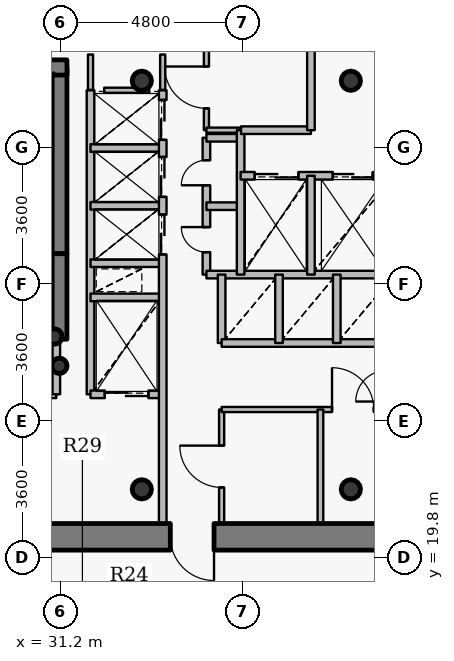
"""IFC4 building model, lengths in metres.
Left out: names, types, materials, properties, quantities, classifications, styles, units other than length and angle.
Written with IfcOpenShell. Run it as: python <this file> out.ifc"""

import sys

from ifc_helpers import new_model, si_unit, direction, frame, frame_2d, origin, origin_2d, place, context, subcontext, project, spatial, rectangle, hollow_circle, extrude, source, transform, mapped, element, fill, save


model = new_model("IFC4")
c1 = context("Model", 3, precision=1e-05, world=origin(), true_north=direction((0.0, 1.0)))
c2 = subcontext(c1, "Body", "Model", "MODEL_VIEW")
j1 = project(units=[si_unit("LENGTHUNIT", "METRE"), si_unit("PLANEANGLEUNIT", "RADIAN")], contexts=[c1])
p1 = place(None, origin())
s1 = spatial("IfcSite", under=j1, at=p1, CompositionType="ELEMENT")
p2 = place(p1, origin())
s2 = spatial("IfcBuilding", under=s1, at=p2, CompositionType="ELEMENT")
p3 = place(p2, frame((0.0, 0.0, 236.55)))
s3 = spatial("IfcBuildingStorey", under=s2, at=p3, CompositionType="ELEMENT", Elevation=236.55)
for number, where, z_axis, x_axis in (
    (1, (33.35, 21.6, 0.0), (0.0, 0.0, 1.0), (1.0, 0.0, 0.0)),
    (2, (38.85, 21.6, 0.0), (0.0, 0.0, 1.0), (1.0, 0.0, 0.0)),
    (3, (38.85, 32.35, 0.0), (0.0, 0.0, 1.0), (1.0, 0.0, 0.0)),
    (4, (33.35, 32.35, 0.0), (0.0, 0.0, 1.0), (1.0, 0.0, 0.0)),
):
    element("IfcColumn", number, at=place(p3, frame(where, z_axis=z_axis, x_axis=x_axis)), inside=s3, PredefinedType="COLUMN", context=c2, shape_type="SweptSolid", body=[
        extrude(hollow_circle(Radius=0.254, WallThickness=0.02, at=origin_2d()), origin(), (0.0, 0.0, 1.0), 3.75),
    ])
p4 = place(p3, frame((31.18, 27.8, 0.0), z_axis=(0.0, 0.0, 1.0), x_axis=(0.0, 1.0, 0.0)))
e5 = element("IfcWall", 5, at=p4, inside=s3, PredefinedType="SHEAR", context=c2, shape_type="SweptSolid", body=[
    extrude(rectangle(XDim=4.9, YDim=0.4, at=frame_2d((2.45, 0.0))), origin(), (0.0, 0.0, 1.0), 3.75),
])
p5 = place(p3, frame((27.28, 32.7, 0.0), z_axis=(0.0, 0.0, 1.0), x_axis=(1.0, 0.0, 0.0)))
e6 = element("IfcWall", 6, at=p5, inside=s3, PredefinedType="SHEAR", context=c2, shape_type="SweptSolid", body=[
    extrude(rectangle(XDim=4.1, YDim=0.4, at=frame_2d((2.05, 0.0))), origin(), (0.0, 0.0, 1.0), 3.75),
])
for number, where, z_axis, x_axis in (
    (7, (31.05, 25.62, 0.0), (0.0, 0.0, 1.0), (1.0, 0.0, 0.0)),
    (8, (31.18, 24.85, 0.0), (0.0, 0.0, 1.0), (1.0, 0.0, 0.0)),
):
    element("IfcColumn", number, at=place(p3, frame(where, z_axis=z_axis, x_axis=x_axis)), inside=s3, PredefinedType="COLUMN", context=c2, shape_type="SweptSolid", body=[
        extrude(hollow_circle(Radius=0.203, WallThickness=0.016, at=origin_2d()), origin(), (0.0, 0.0, 1.0), 3.75),
    ])
p6 = place(p3, frame((44.95, 20.35, 0.0), z_axis=(0.0, 0.0, 1.0), x_axis=(-1.0, 0.0, 0.0)))
e9 = element("IfcWall", 9, at=p6, inside=s3, PredefinedType="SHEAR", context=c2, shape_type="SweptSolid", body=[
    extrude(rectangle(XDim=17.9, YDim=0.7, at=frame_2d((8.95, 0.0))), origin(), (0.0, 0.0, 1.0), 3.05),
])
p7 = place(p6, frame((9.7, 0.0, 0.0)))
e10 = element("IfcOpeningElement", 10, at=p7, cuts=e9, PredefinedType="OPENING", context=c2, shape_type="SweptSolid", body=[
    extrude(rectangle(XDim=1.15, YDim=2.15, at=origin_2d()), frame((0.575, 0.36, 1.075), z_axis=(0.0, -1.0, 0.0), x_axis=(1.0, 0.0, 0.0)), (0.0, 0.0, 1.0), 0.72),
])
p8 = place(p3, frame((31.18, 25.55, 0.0), z_axis=(0.0, 0.0, 1.0), x_axis=(0.0, 1.0, 0.0)))
e11 = element("IfcWall", 11, at=p8, inside=s3, PredefinedType="SHEAR", context=c2, shape_type="SweptSolid", body=[
    extrude(rectangle(XDim=2.25, YDim=0.4, at=frame_2d((1.125, 0.0))), origin(), (0.0, 0.0, 1.0), 3.1),
])
p9 = place(p3, frame((27.56, 24.1, 0.0), z_axis=(0.0, 0.0, 1.0), x_axis=(1.0, 0.0, 0.0)))
e12 = element("IfcWall", 12, at=p9, inside=s3, PredefinedType="PARTITIONING", context=c2, shape_type="SweptSolid", body=[
    extrude(rectangle(XDim=3.54, YDim=0.2, at=frame_2d((1.77, 0.0))), origin(), (0.0, 0.0, 1.0), 3.5),
])
p10 = place(p9, frame((1.17, 0.0, 0.0)))
e13 = element("IfcOpeningElement", 13, at=p10, cuts=e12, PredefinedType="OPENING", context=c2, shape_type="SweptSolid", body=[
    extrude(rectangle(XDim=1.2, YDim=2.15, at=origin_2d()), frame((0.6, 0.11, 1.075), z_axis=(0.0, -1.0, 0.0), x_axis=(1.0, 0.0, 0.0)), (0.0, 0.0, 1.0), 0.22),
])
p11 = place(p3, frame((31.1, 24.1, 0.0), z_axis=(0.0, 0.0, 1.0), x_axis=(0.0, 1.0, 0.0)))
e14 = element("IfcWall", 14, at=p11, inside=s3, PredefinedType="PARTITIONING", context=c2, shape_type="SweptSolid", body=[
    extrude(rectangle(XDim=1.44, YDim=0.2, at=frame_2d((0.72, 0.0))), origin(), (0.0, 0.0, 1.0), 3.5),
])
p12 = place(p3, frame((32.0, 24.1, 0.0), z_axis=(0.0, 0.0, 1.0), x_axis=(0.0, 1.0, 0.0)))
e15 = element("IfcWall", 15, at=p12, inside=s3, PredefinedType="PARTITIONING", context=c2, shape_type="SweptSolid", body=[
    extrude(rectangle(XDim=8.0, YDim=0.2, at=frame_2d((4.0, 0.0))), origin(), (0.0, 0.0, 1.0), 3.5),
])
p13 = place(p3, frame((32.0, 24.1, 0.0), z_axis=(0.0, 0.0, 1.0), x_axis=(1.0, 0.0, 0.0)))
e16 = element("IfcWall", 16, at=p13, inside=s3, PredefinedType="PARTITIONING", context=c2, shape_type="SweptSolid", body=[
    extrude(rectangle(XDim=1.9, YDim=0.2, at=frame_2d((0.95, 0.0))), origin(), (0.0, 0.0, 1.0), 3.085),
])
p14 = place(p13, frame((0.375, 0.0, 0.0)))
e17 = element("IfcOpeningElement", 17, at=p14, cuts=e16, PredefinedType="OPENING", context=c2, shape_type="SweptSolid", body=[
    extrude(rectangle(XDim=1.15, YDim=2.15, at=origin_2d()), frame((0.575, 0.11, 1.075), z_axis=(0.0, -1.0, 0.0), x_axis=(1.0, 0.0, 0.0)), (0.0, 0.0, 1.0), 0.22),
])
for number, where, z_axis, x_axis in (
    (18, (32.0, 26.65, 0.0), (0.0, 0.0, 1.0), (1.0, 0.0, 0.0)),
    (19, (32.0, 27.55, 0.0), (0.0, 0.0, 1.0), (1.0, 0.0, 0.0)),
    (20, (32.0, 29.06, 0.0), (0.0, 0.0, 1.0), (1.0, 0.0, 0.0)),
    (21, (32.0, 30.58, 0.0), (0.0, 0.0, 1.0), (1.0, 0.0, 0.0)),
):
    element("IfcWall", number, at=place(p3, frame(where, z_axis=z_axis, x_axis=x_axis)), inside=s3, PredefinedType="PARTITIONING", context=c2, shape_type="SweptSolid", body=[
        extrude(rectangle(XDim=1.9, YDim=0.2, at=frame_2d((0.95, 0.0))), origin(), (0.0, 0.0, 1.0), 3.085),
    ])
p15 = place(p3, frame((33.9, 20.7, 0.0), z_axis=(0.0, 0.0, 1.0), x_axis=(0.0, 1.0, 0.0)))
e22 = element("IfcWall", 22, at=p15, inside=s3, PredefinedType="PARTITIONING", context=c2, shape_type="SweptSolid", body=[
    extrude(rectangle(XDim=11.4, YDim=0.2, at=frame_2d((5.7, 0.0))), origin(), (0.0, 0.0, 1.0), 3.085),
])
p16 = place(p15, frame((7.08, 0.0, 0.0)))
e23 = element("IfcOpeningElement", 23, at=p16, cuts=e22, PredefinedType="OPENING", context=c2, shape_type="SweptSolid", body=[
    extrude(rectangle(XDim=1.05, YDim=2.15, at=origin_2d()), frame((0.525, 0.11, 1.075), z_axis=(0.0, -1.0, 0.0), x_axis=(1.0, 0.0, 0.0)), (0.0, 0.0, 1.0), 0.22),
])
p17 = place(p15, frame((8.595, 0.0, 0.0)))
e24 = element("IfcOpeningElement", 24, at=p17, cuts=e22, PredefinedType="OPENING", context=c2, shape_type="SweptSolid", body=[
    extrude(rectangle(XDim=1.05, YDim=2.15, at=origin_2d()), frame((0.525, 0.11, 1.075), z_axis=(0.0, -1.0, 0.0), x_axis=(1.0, 0.0, 0.0)), (0.0, 0.0, 1.0), 0.22),
])
p18 = place(p15, frame((10.095, 0.0, 0.0)))
e25 = element("IfcOpeningElement", 25, at=p18, cuts=e22, PredefinedType="OPENING", context=c2, shape_type="SweptSolid", body=[
    extrude(rectangle(XDim=1.05, YDim=2.15, at=origin_2d()), frame((0.525, 0.11, 1.075), z_axis=(0.0, -1.0, 0.0), x_axis=(1.0, 0.0, 0.0)), (0.0, 0.0, 1.0), 0.22),
])
p19 = place(p3, frame((35.05, 27.25, 0.0), z_axis=(0.0, 0.0, 1.0), x_axis=(0.0, 1.0, 0.0)))
e26 = element("IfcWall", 26, at=p19, inside=s3, PredefinedType="PARTITIONING", context=c2, shape_type="SweptSolid", body=[
    extrude(rectangle(XDim=3.6, YDim=0.2, at=frame_2d((1.8, 0.0))), origin(), (0.0, 0.0, 1.0), 3.5),
])
p20 = place(p19, frame((0.59, 0.0, 0.0)))
e27 = element("IfcOpeningElement", 27, at=p20, cuts=e26, PredefinedType="OPENING", context=c2, shape_type="SweptSolid", body=[
    extrude(rectangle(XDim=0.66, YDim=2.05, at=origin_2d()), frame((0.33, 0.11, 1.025), z_axis=(0.0, -1.0, 0.0), x_axis=(1.0, 0.0, 0.0)), (0.0, 0.0, 1.0), 0.22),
])
p21 = place(p19, frame((2.35, 0.0, 0.0)))
e28 = element("IfcOpeningElement", 28, at=p21, cuts=e26, PredefinedType="OPENING", context=c2, shape_type="SweptSolid", body=[
    extrude(rectangle(XDim=0.66, YDim=2.05, at=origin_2d()), frame((0.33, 0.11, 1.025), z_axis=(0.0, -1.0, 0.0), x_axis=(1.0, 0.0, 0.0)), (0.0, 0.0, 1.0), 0.22),
])
p22 = place(p3, frame((35.05, 27.25, 0.0), z_axis=(0.0, 0.0, 1.0), x_axis=(1.0, 0.0, 0.0)))
e29 = element("IfcWall", 29, at=p22, inside=s3, PredefinedType="PARTITIONING", context=c2, shape_type="SweptSolid", body=[
    extrude(rectangle(XDim=4.95, YDim=0.2, at=frame_2d((2.475, 0.0))), origin(), (0.0, 0.0, 1.0), 3.085),
])
for number, where, z_axis, x_axis in (
    (30, (35.05, 29.05, 0.0), (0.0, 0.0, 1.0), (1.0, 0.0, 0.0)),
    (31, (35.05, 30.85, 0.0), (0.0, 0.0, 1.0), (1.0, 0.0, 0.0)),
):
    element("IfcWall", number, at=place(p3, frame(where, z_axis=z_axis, x_axis=x_axis)), inside=s3, PredefinedType="PARTITIONING", context=c2, shape_type="SweptSolid", body=[
        extrude(rectangle(XDim=0.9, YDim=0.2, at=frame_2d((0.45, 0.0))), origin(), (0.0, 0.0, 1.0), 3.5),
    ])
p23 = place(p3, frame((35.05, 31.05, 0.0), z_axis=(0.0, 0.0, 1.0), x_axis=(0.0, 1.0, 0.0)))
e32 = element("IfcWall", 32, at=p23, inside=s3, PredefinedType="PARTITIONING", context=c2, shape_type="SweptSolid", body=[
    extrude(rectangle(XDim=2.25, YDim=0.135, at=frame_2d((1.125, 0.0))), origin(), (0.0, 0.0, 1.0), 3.085),
])
p24 = place(p23, frame((0.575, 0.0, 0.0)))
e33 = element("IfcOpeningElement", 33, at=p24, cuts=e32, PredefinedType="OPENING", context=c2, shape_type="SweptSolid", body=[
    extrude(rectangle(XDim=1.1, YDim=2.15, at=origin_2d()), frame((0.55, 0.078, 1.075), z_axis=(0.0, -1.0, 0.0), x_axis=(1.0, 0.0, 0.0)), (0.0, 0.0, 1.0), 0.155),
])
p25 = place(p3, frame((35.05, 31.05, 0.0), z_axis=(0.0, 0.0, 1.0), x_axis=(1.0, 0.0, 0.0)))
e34 = element("IfcWall", 34, at=p25, inside=s3, PredefinedType="PARTITIONING", context=c2, shape_type="SweptSolid", body=[
    extrude(rectangle(XDim=0.9, YDim=0.135, at=frame_2d((0.45, 0.0))), origin(), (0.0, 0.0, 1.0), 3.5),
])
p26 = place(p3, frame((35.45, 20.7, 0.0), z_axis=(0.0, 0.0, 1.0), x_axis=(0.0, 1.0, 0.0)))
e35 = element("IfcWall", 35, at=p26, inside=s3, PredefinedType="PARTITIONING", context=c2, shape_type="SweptSolid", body=[
    extrude(rectangle(XDim=3.0, YDim=0.135, at=frame_2d((1.5, 0.0))), origin(), (0.0, 0.0, 1.0), 3.085),
])
p27 = place(p26, frame((0.95, 0.0, 0.0)))
e36 = element("IfcOpeningElement", 36, at=p27, cuts=e35, PredefinedType="OPENING", context=c2, shape_type="SweptSolid", body=[
    extrude(rectangle(XDim=1.1, YDim=2.15, at=origin_2d()), frame((0.55, 0.078, 1.075), z_axis=(0.0, -1.0, 0.0), x_axis=(1.0, 0.0, 0.0)), (0.0, 0.0, 1.0), 0.155),
])
p28 = place(p3, frame((35.45, 23.7, 0.0), z_axis=(0.0, 0.0, 1.0), x_axis=(1.0, 0.0, 0.0)))
e37 = element("IfcWall", 37, at=p28, inside=s3, PredefinedType="PARTITIONING", context=c2, shape_type="SweptSolid", body=[
    extrude(rectangle(XDim=4.35, YDim=0.135, at=frame_2d((2.175, 0.0))), origin(), (0.0, 0.0, 1.0), 3.085),
])
p29 = place(p28, frame((2.905, 0.0, 0.0)))
e38 = element("IfcOpeningElement", 38, at=p29, cuts=e37, PredefinedType="OPENING", context=c2, shape_type="SweptSolid", body=[
    extrude(rectangle(XDim=1.1, YDim=2.15, at=origin_2d()), frame((0.55, 0.078, 1.075), z_axis=(0.0, -1.0, 0.0), x_axis=(1.0, 0.0, 0.0)), (0.0, 0.0, 1.0), 0.155),
])
p30 = place(p3, frame((35.45, 25.45, 0.0), z_axis=(0.0, 0.0, 1.0), x_axis=(0.0, 1.0, 0.0)))
e39 = element("IfcWall", 39, at=p30, inside=s3, PredefinedType="PARTITIONING", context=c2, shape_type="SweptSolid", body=[
    extrude(rectangle(XDim=1.8, YDim=0.2, at=frame_2d((0.9, 0.0))), origin(), (0.0, 0.0, 1.0), 3.5),
])
p31 = place(p3, frame((35.45, 25.45, 0.0), z_axis=(0.0, 0.0, 1.0), x_axis=(1.0, 0.0, 0.0)))
e40 = element("IfcWall", 40, at=p31, inside=s3, PredefinedType="PARTITIONING", context=c2, shape_type="SweptSolid", body=[
    extrude(rectangle(XDim=4.55, YDim=0.2, at=frame_2d((2.275, 0.0))), origin(), (0.0, 0.0, 1.0), 3.085),
])
p32 = place(p3, frame((35.95, 27.25, 0.0), z_axis=(0.0, 0.0, 1.0), x_axis=(0.0, 1.0, 0.0)))
e41 = element("IfcWall", 41, at=p32, inside=s3, PredefinedType="PARTITIONING", context=c2, shape_type="SweptSolid", body=[
    extrude(rectangle(XDim=3.8, YDim=0.2, at=frame_2d((1.9, 0.0))), origin(), (0.0, 0.0, 1.0), 3.5),
])
p33 = place(p3, frame((35.95, 29.85, 0.0), z_axis=(0.0, 0.0, 1.0), x_axis=(1.0, 0.0, 0.0)))
e42 = element("IfcWall", 42, at=p33, inside=s3, PredefinedType="PARTITIONING", context=c2, shape_type="SweptSolid", body=[
    extrude(rectangle(XDim=8.49, YDim=0.2, at=frame_2d((4.245, 0.0))), origin(), (0.0, 0.0, 1.0), 3.085),
])
p34 = place(p33, frame((6.1, 0.0, 0.0)))
e43 = element("IfcOpeningElement", 43, at=p34, cuts=e42, PredefinedType="OPENING", context=c2, shape_type="SweptSolid", body=[
    extrude(rectangle(XDim=1.2, YDim=2.15, at=origin_2d()), frame((0.6, 0.11, 1.075), z_axis=(0.0, -1.0, 0.0), x_axis=(1.0, 0.0, 0.0)), (0.0, 0.0, 1.0), 0.22),
])
p35 = place(p33, frame((0.37, 0.0, 0.0)))
e44 = element("IfcOpeningElement", 44, at=p35, cuts=e42, PredefinedType="OPENING", context=c2, shape_type="SweptSolid", body=[
    extrude(rectangle(XDim=1.15, YDim=2.15, at=origin_2d()), frame((0.575, 0.11, 1.075), z_axis=(0.0, -1.0, 0.0), x_axis=(1.0, 0.0, 0.0)), (0.0, 0.0, 1.0), 0.22),
])
p36 = place(p33, frame((2.425, 0.0, 0.0)))
e45 = element("IfcOpeningElement", 45, at=p36, cuts=e42, PredefinedType="OPENING", context=c2, shape_type="SweptSolid", body=[
    extrude(rectangle(XDim=1.05, YDim=2.15, at=origin_2d()), frame((0.525, 0.11, 1.075), z_axis=(0.0, -1.0, 0.0), x_axis=(1.0, 0.0, 0.0)), (0.0, 0.0, 1.0), 0.22),
])
p37 = place(p3, frame((35.96, 31.05, 0.0), z_axis=(0.0, 0.0, 1.0), x_axis=(1.0, 0.0, 0.0)))
e46 = element("IfcWall", 46, at=p37, inside=s3, PredefinedType="PARTITIONING", context=c2, shape_type="SweptSolid", body=[
    extrude(rectangle(XDim=1.84, YDim=0.2, at=frame_2d((0.92, 0.0))), origin(), (0.0, 0.0, 1.0), 3.5),
])
p38 = place(p3, frame((36.96, 25.45, 0.0), z_axis=(0.0, 0.0, 1.0), x_axis=(0.0, 1.0, 0.0)))
e47 = element("IfcWall", 47, at=p38, inside=s3, PredefinedType="PARTITIONING", context=c2, shape_type="SweptSolid", body=[
    extrude(rectangle(XDim=1.8, YDim=0.2, at=frame_2d((0.9, 0.0))), origin(), (0.0, 0.0, 1.0), 3.5),
])
p39 = place(p3, frame((37.8, 27.25, 0.0), z_axis=(0.0, 0.0, 1.0), x_axis=(0.0, 1.0, 0.0)))
e48 = element("IfcWall", 48, at=p39, inside=s3, PredefinedType="PARTITIONING", context=c2, shape_type="SweptSolid", body=[
    extrude(rectangle(XDim=2.6, YDim=0.2, at=frame_2d((1.3, 0.0))), origin(), (0.0, 0.0, 1.0), 3.5),
])
p40 = place(p3, frame((37.8, 31.05, 0.0), z_axis=(0.0, 0.0, 1.0), x_axis=(0.0, 1.0, 0.0)))
e49 = element("IfcWall", 49, at=p40, inside=s3, PredefinedType="PARTITIONING", context=c2, shape_type="SweptSolid", body=[
    extrude(rectangle(XDim=2.25, YDim=0.2, at=frame_2d((1.125, 0.0))), origin(), (0.0, 0.0, 1.0), 3.085),
])
p41 = place(p3, frame((38.05, 20.18, 0.0), z_axis=(0.0, 0.0, 1.0), x_axis=(0.0, 1.0, 0.0)))
e50 = element("IfcWall", 50, at=p41, inside=s3, PredefinedType="PARTITIONING", context=c2, shape_type="SweptSolid", body=[
    extrude(rectangle(XDim=3.52, YDim=0.15, at=frame_2d((1.76, 0.0))), origin(), (0.0, 0.0, 1.0), 3.035),
])
p42 = place(p3, frame((38.48, 25.45, 0.0), z_axis=(0.0, 0.0, 1.0), x_axis=(0.0, 1.0, 0.0)))
e51 = element("IfcWall", 51, at=p42, inside=s3, PredefinedType="PARTITIONING", context=c2, shape_type="SweptSolid", body=[
    extrude(rectangle(XDim=1.8, YDim=0.2, at=frame_2d((0.9, 0.0))), origin(), (0.0, 0.0, 1.0), 3.5),
])
p43 = place(p3, frame((32.36, 32.1, 0.0), z_axis=(0.0, 0.0, 1.0), x_axis=(1.0, 0.0, 0.0)))
e52 = element("IfcWall", 52, at=p43, inside=s3, PredefinedType="PARTITIONING", context=c2, shape_type="SweptSolid", body=[
    extrude(rectangle(XDim=1.18, YDim=0.135, at=frame_2d((0.59, 0.0))), origin(), (0.0, 0.0, 1.0), 3.085),
])
p44 = place(p3, frame((32.0, 33.04, 0.0), z_axis=(0.0, 0.0, 1.0), x_axis=(0.0, -1.0, 0.0)))
e53 = element("IfcWall", 53, at=p44, inside=s3, PredefinedType="PARTITIONING", context=c2, shape_type="SweptSolid", body=[
    extrude(rectangle(XDim=0.93, YDim=0.135, at=frame_2d((0.465, 0.0))), origin(), (0.0, 0.0, 1.0), 3.035),
])
p45 = place(p3, frame((33.9, 32.11, 0.0), z_axis=(0.0, 0.0, 1.0), x_axis=(0.0, 1.0, 0.0)))
e54 = element("IfcWall", 54, at=p45, inside=s3, PredefinedType="PARTITIONING", context=c2, shape_type="SweptSolid", body=[
    extrude(rectangle(XDim=0.93, YDim=0.135, at=frame_2d((0.465, 0.0))), origin(), (0.0, 0.0, 1.0), 3.085),
])
m1 = source(origin(), c2, "Body", "SweptSolid", [
    extrude(rectangle(XDim=1.15, YDim=2.15, at=origin_2d()), frame((0.575, 0.025, 1.075), z_axis=(0.0, -1.0, 0.0), x_axis=(1.0, 0.0, 0.0)), (0.0, 0.0, 1.0), 0.05),
])
p46 = place(p7, origin())
e55 = element("IfcDoor", 55, at=p46, inside=s3, OperationType="SINGLE_SWING_LEFT", PredefinedType="DOOR", context=c2, shape_type="MappedRepresentation", body=[
    mapped(m1, transform((0.0, 0.0, 0.0), x_axis=(1.0, 0.0, 0.0), y_axis=(0.0, 1.0, 0.0), z_axis=(0.0, 0.0, 1.0), scale=1.0)),
])
fill(e10, e55)
m2 = source(origin(), c2, "Body", "SweptSolid", [
    extrude(rectangle(XDim=1.15, YDim=2.15, at=origin_2d()), frame((0.575, 0.025, 1.075), z_axis=(0.0, -1.0, 0.0), x_axis=(1.0, 0.0, 0.0)), (0.0, 0.0, 1.0), 0.05),
])
p47 = place(p35, origin())
e56 = element("IfcDoor", 56, at=p47, inside=s3, OperationType="DOUBLE_DOOR_SLIDING", PredefinedType="USERDEFINED", context=c2, shape_type="MappedRepresentation", body=[
    mapped(m2, transform((0.0, 0.0, 0.0), x_axis=(1.0, 0.0, 0.0), y_axis=(0.0, 1.0, 0.0), z_axis=(0.0, 0.0, 1.0), scale=1.0)),
])
fill(e44, e56)
p48 = place(p14, origin())
e57 = element("IfcDoor", 57, at=p48, inside=s3, OperationType="DOUBLE_DOOR_SLIDING", PredefinedType="USERDEFINED", context=c2, shape_type="MappedRepresentation", body=[
    mapped(m2, transform((0.0, 0.0, 0.0), x_axis=(1.0, 0.0, 0.0), y_axis=(0.0, 1.0, 0.0), z_axis=(0.0, 0.0, 1.0), scale=1.0)),
])
fill(e17, e57)
m3 = source(origin(), c2, "Body", "SweptSolid", [
    extrude(rectangle(XDim=1.05, YDim=2.15, at=origin_2d()), frame((0.525, 0.025, 1.075), z_axis=(0.0, -1.0, 0.0), x_axis=(1.0, 0.0, 0.0)), (0.0, 0.0, 1.0), 0.05),
])
p49 = place(p36, origin())
e58 = element("IfcDoor", 58, at=p49, inside=s3, OperationType="DOUBLE_DOOR_SLIDING", PredefinedType="USERDEFINED", context=c2, shape_type="MappedRepresentation", body=[
    mapped(m3, transform((0.0, 0.0, 0.0), x_axis=(1.0, 0.0, 0.0), y_axis=(0.0, 1.0, 0.0), z_axis=(0.0, 0.0, 1.0), scale=1.0)),
])
fill(e45, e58)
p50 = place(p16, origin())
e59 = element("IfcDoor", 59, at=p50, inside=s3, OperationType="DOUBLE_DOOR_SLIDING", PredefinedType="USERDEFINED", context=c2, shape_type="MappedRepresentation", body=[
    mapped(m3, transform((0.0, 0.0, 0.0), x_axis=(1.0, 0.0, 0.0), y_axis=(0.0, 1.0, 0.0), z_axis=(0.0, 0.0, 1.0), scale=1.0)),
])
fill(e23, e59)
p51 = place(p17, origin())
e60 = element("IfcDoor", 60, at=p51, inside=s3, OperationType="DOUBLE_DOOR_SLIDING", PredefinedType="USERDEFINED", context=c2, shape_type="MappedRepresentation", body=[
    mapped(m3, transform((0.0, 0.0, 0.0), x_axis=(1.0, 0.0, 0.0), y_axis=(0.0, 1.0, 0.0), z_axis=(0.0, 0.0, 1.0), scale=1.0)),
])
fill(e24, e60)
p52 = place(p18, origin())
e61 = element("IfcDoor", 61, at=p52, inside=s3, OperationType="DOUBLE_DOOR_SLIDING", PredefinedType="USERDEFINED", context=c2, shape_type="MappedRepresentation", body=[
    mapped(m3, transform((0.0, 0.0, 0.0), x_axis=(1.0, 0.0, 0.0), y_axis=(0.0, 1.0, 0.0), z_axis=(0.0, 0.0, 1.0), scale=1.0)),
])
fill(e25, e61)
m4 = source(origin(), c2, "Body", "SweptSolid", [
    extrude(rectangle(XDim=0.66, YDim=2.05, at=origin_2d()), frame((0.33, 0.025, 1.025), z_axis=(0.0, -1.0, 0.0), x_axis=(1.0, 0.0, 0.0)), (0.0, 0.0, 1.0), 0.05),
])
p53 = place(p20, origin())
e62 = element("IfcDoor", 62, at=p53, inside=s3, OperationType="SINGLE_SWING_RIGHT", PredefinedType="USERDEFINED", context=c2, shape_type="MappedRepresentation", body=[
    mapped(m4, transform((0.0, 0.0, 0.0), x_axis=(1.0, 0.0, 0.0), y_axis=(0.0, 1.0, 0.0), z_axis=(0.0, 0.0, 1.0), scale=1.0)),
])
fill(e27, e62)
p54 = place(p21, origin())
e63 = element("IfcDoor", 63, at=p54, inside=s3, OperationType="SINGLE_SWING_LEFT", PredefinedType="USERDEFINED", context=c2, shape_type="MappedRepresentation", body=[
    mapped(m4, transform((0.0, 0.0, 0.0), x_axis=(1.0, 0.0, 0.0), y_axis=(0.0, 1.0, 0.0), z_axis=(0.0, 0.0, 1.0), scale=1.0)),
])
fill(e28, e63)
m5 = source(origin(), c2, "Body", "SweptSolid", [
    extrude(rectangle(XDim=1.1, YDim=2.15, at=origin_2d()), frame((0.55, 0.025, 1.075), z_axis=(0.0, -1.0, 0.0), x_axis=(1.0, 0.0, 0.0)), (0.0, 0.0, 1.0), 0.05),
])
p55 = place(p27, origin())
e64 = element("IfcDoor", 64, at=p55, inside=s3, OperationType="SINGLE_SWING_RIGHT", PredefinedType="DOOR", context=c2, shape_type="MappedRepresentation", body=[
    mapped(m5, transform((0.0, 0.0, 0.0), x_axis=(1.0, 0.0, 0.0), y_axis=(0.0, 1.0, 0.0), z_axis=(0.0, 0.0, 1.0), scale=1.0)),
])
fill(e36, e64)
p56 = place(p29, origin())
e65 = element("IfcDoor", 65, at=p56, inside=s3, OperationType="SINGLE_SWING_LEFT", PredefinedType="DOOR", context=c2, shape_type="MappedRepresentation", body=[
    mapped(m5, transform((0.0, 0.0, 0.0), x_axis=(1.0, 0.0, 0.0), y_axis=(0.0, 1.0, 0.0), z_axis=(0.0, 0.0, 1.0), scale=1.0)),
])
fill(e38, e65)
p57 = place(p24, origin())
e66 = element("IfcDoor", 66, at=p57, inside=s3, OperationType="SINGLE_SWING_RIGHT", PredefinedType="DOOR", context=c2, shape_type="MappedRepresentation", body=[
    mapped(m5, transform((0.0, 0.0, 0.0), x_axis=(1.0, 0.0, 0.0), y_axis=(0.0, 1.0, 0.0), z_axis=(0.0, 0.0, 1.0), scale=1.0)),
])
fill(e33, e66)
save(model, sys.argv[1])
